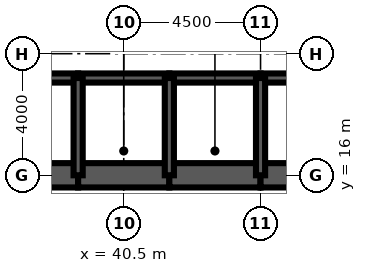
"""IFC4 building model, lengths in metres.
Left out: names, types, materials, properties, quantities, classifications, styles, units other than length and angle.
Written with IfcOpenShell. Run it as: python <this file> out.ifc"""

import sys

from ifc_helpers import new_model, si_unit, direction, frame, frame_2d, origin, place, context, subcontext, project, spatial, rectangle, extrude, element, fill, save


model = new_model("IFC4")
c1 = context("Model", 3, precision=1e-05, world=origin(), true_north=direction((0.0, 1.0)))
c2 = subcontext(c1, "Body", "Model", "MODEL_VIEW")
j1 = project(units=[si_unit("LENGTHUNIT", "METRE"), si_unit("PLANEANGLEUNIT", "RADIAN")], contexts=[c1])
p1 = place(None, origin())
s1 = spatial("IfcSite", under=j1, at=p1, CompositionType="ELEMENT")
p2 = place(p1, origin())
s2 = spatial("IfcBuilding", under=s1, at=p2, CompositionType="ELEMENT")
p3 = place(p2, frame((0.0, 0.0, 236.2)))
s3 = spatial("IfcBuildingStorey", under=s2, at=p3, CompositionType="ELEMENT", Elevation=236.2)
for number, where, z_axis, x_axis in (
    (1, (36.0, 16.0, 0.0), (0.0, 0.0, 1.0), (1.0, 0.0, 0.0)),
    (2, (39.0, 16.0, 0.0), (0.0, 0.0, 1.0), (1.0, 0.0, 0.0)),
    (3, (42.0, 16.0, 0.0), (0.0, 0.0, 1.0), (1.0, 0.0, 0.0)),
):
    element("IfcWall", number, at=place(p3, frame(where, z_axis=z_axis, x_axis=x_axis)), inside=s3, PredefinedType="SHEAR", context=c2, shape_type="SweptSolid", body=[
        extrude(rectangle(XDim=3.0, YDim=0.8, at=frame_2d((1.5, 0.0))), origin(), (0.0, 0.0, 1.0), 4.2),
    ])
p4 = place(p3, frame((45.0, 16.0, 0.0), z_axis=(0.0, 0.0, 1.0), x_axis=(1.0, 0.0, 0.0)))
e4 = element("IfcWall", 4, at=p4, inside=s3, PredefinedType="SHEAR", context=c2, shape_type="SweptSolid", body=[
    extrude(rectangle(XDim=9.4, YDim=0.8, at=frame_2d((4.7, 0.0))), origin(), (0.0, 0.0, 1.0), 4.2),
])
p5 = place(p3, frame((36.0, 19.2, 0.0), z_axis=(0.0, 0.0, 1.0), x_axis=(1.0, 0.0, 0.0)))
e5 = element("IfcWall", 5, at=p5, inside=s3, PredefinedType="SOLIDWALL", context=c2, shape_type="SweptSolid", body=[
    extrude(rectangle(XDim=3.0, YDim=0.3, at=frame_2d((1.5, 0.0))), origin(), (0.0, 0.0, 1.0), 4.2),
])
p6 = place(p5, frame((0.95, 0.0, 0.0)))
e6 = element("IfcOpeningElement", 6, at=p6, cuts=e5, PredefinedType="OPENING", context=c2, shape_type="SweptSolid", body=[
    extrude(rectangle(XDim=1.1, YDim=2.2, at=frame_2d((0.55, 1.1))), frame((0.0, 0.16, 0.0), z_axis=(0.0, -1.0, 0.0), x_axis=(1.0, 0.0, 0.0)), (0.0, 0.0, 1.0), 0.32),
])
p7 = place(p3, frame((39.0, 19.2, 0.0), z_axis=(0.0, 0.0, 1.0), x_axis=(1.0, 0.0, 0.0)))
e7 = element("IfcWall", 7, at=p7, inside=s3, PredefinedType="SOLIDWALL", context=c2, shape_type="SweptSolid", body=[
    extrude(rectangle(XDim=3.0, YDim=0.3, at=frame_2d((1.5, 0.0))), origin(), (0.0, 0.0, 1.0), 4.2),
])
p8 = place(p7, frame((1.0, 0.0, 0.0)))
e8 = element("IfcOpeningElement", 8, at=p8, cuts=e7, PredefinedType="OPENING", context=c2, shape_type="SweptSolid", body=[
    extrude(rectangle(XDim=1.0, YDim=2.1, at=frame_2d((0.5, 1.05))), frame((0.0, 0.16, 0.0), z_axis=(0.0, -1.0, 0.0), x_axis=(1.0, 0.0, 0.0)), (0.0, 0.0, 1.0), 0.32),
])
p9 = place(p3, frame((42.0, 19.2, 0.0), z_axis=(0.0, 0.0, 1.0), x_axis=(1.0, 0.0, 0.0)))
e9 = element("IfcWall", 9, at=p9, inside=s3, PredefinedType="SOLIDWALL", context=c2, shape_type="SweptSolid", body=[
    extrude(rectangle(XDim=3.0, YDim=0.3, at=frame_2d((1.5, 0.0))), origin(), (0.0, 0.0, 1.0), 4.2),
])
p10 = place(p9, frame((1.0, 0.0, 0.0)))
e10 = element("IfcOpeningElement", 10, at=p10, cuts=e9, PredefinedType="OPENING", context=c2, shape_type="SweptSolid", body=[
    extrude(rectangle(XDim=1.0, YDim=2.1, at=frame_2d((0.5, 1.05))), frame((0.0, 0.16, 0.0), z_axis=(0.0, -1.0, 0.0), x_axis=(1.0, 0.0, 0.0)), (0.0, 0.0, 1.0), 0.32),
])
p11 = place(p3, frame((45.0, 19.2, 0.0), z_axis=(0.0, 0.0, 1.0), x_axis=(1.0, 0.0, 0.0)))
e11 = element("IfcWall", 11, at=p11, inside=s3, PredefinedType="SOLIDWALL", context=c2, shape_type="SweptSolid", body=[
    extrude(rectangle(XDim=9.0, YDim=0.3, at=frame_2d((4.5, 0.0))), origin(), (0.0, 0.0, 1.0), 4.2),
])
p12 = place(p11, frame((7.35, 0.0, 0.0)))
e12 = element("IfcOpeningElement", 12, at=p12, cuts=e11, PredefinedType="OPENING", context=c2, shape_type="SweptSolid", body=[
    extrude(rectangle(XDim=1.0, YDim=2.1, at=frame_2d((0.5, 1.05))), frame((0.0, 0.16, 0.0), z_axis=(0.0, -1.0, 0.0), x_axis=(1.0, 0.0, 0.0)), (0.0, 0.0, 1.0), 0.32),
])
for number, where, z_axis, x_axis in (
    (13, (39.0, 16.0, 0.0), (0.0, 0.0, 1.0), (0.0, 1.0, 0.0)),
    (14, (42.0, 16.0, 0.0), (0.0, 0.0, 1.0), (0.0, 1.0, 0.0)),
    (15, (45.0, 16.0, 0.0), (0.0, 0.0, 1.0), (0.0, 1.0, 0.0)),
):
    element("IfcWall", number, at=place(p3, frame(where, z_axis=z_axis, x_axis=x_axis)), inside=s3, PredefinedType="SOLIDWALL", context=c2, shape_type="SweptSolid", body=[
        extrude(rectangle(XDim=3.2, YDim=0.3, at=frame_2d((1.6, 0.0))), origin(), (0.0, 0.0, 1.0), 4.2),
    ])
p13 = place(p3, frame((39.15, 17.35, 0.0), z_axis=(0.0, 0.0, 1.0), x_axis=(1.0, 0.0, 0.0)))
e16 = element("IfcWall", 16, at=p13, inside=s3, PredefinedType="SOLIDWALL", context=c2, shape_type="SweptSolid", body=[
    extrude(rectangle(XDim=2.7, YDim=0.3, at=frame_2d((1.35, 0.0))), origin(), (0.0, 0.0, 1.0), 4.04),
])
p14 = place(p13, frame((0.85, 0.0, 0.0)))
e17 = element("IfcOpeningElement", 17, at=p14, cuts=e16, PredefinedType="OPENING", context=c2, shape_type="SweptSolid", body=[
    extrude(rectangle(XDim=1.0, YDim=2.1, at=frame_2d((0.5, 1.05))), frame((0.0, 0.16, 0.0), z_axis=(0.0, -1.0, 0.0), x_axis=(1.0, 0.0, 0.0)), (0.0, 0.0, 1.0), 0.32),
])
p15 = place(p3, frame((42.15, 17.35, 0.0), z_axis=(0.0, 0.0, 1.0), x_axis=(1.0, 0.0, 0.0)))
e18 = element("IfcWall", 18, at=p15, inside=s3, PredefinedType="SOLIDWALL", context=c2, shape_type="SweptSolid", body=[
    extrude(rectangle(XDim=2.7, YDim=0.3, at=frame_2d((1.35, 0.0))), origin(), (0.0, 0.0, 1.0), 4.04),
])
p16 = place(p15, frame((0.85, 0.0, 0.0)))
e19 = element("IfcOpeningElement", 19, at=p16, cuts=e18, PredefinedType="OPENING", context=c2, shape_type="SweptSolid", body=[
    extrude(rectangle(XDim=1.0, YDim=2.1, at=frame_2d((0.5, 1.05))), frame((0.0, 0.16, 0.0), z_axis=(0.0, -1.0, 0.0), x_axis=(1.0, 0.0, 0.0)), (0.0, 0.0, 1.0), 0.32),
])
p17 = place(p14, origin())
e20 = element("IfcDoor", 20, at=p17, inside=s3, OperationType="SINGLE_SWING_LEFT", PredefinedType="DOOR", context=c2, shape_type="SweptSolid", body=[
    extrude(rectangle(XDim=1.0, YDim=2.1, at=frame_2d((0.5, 1.05))), frame((0.0, 0.025, 0.0), z_axis=(0.0, -1.0, 0.0), x_axis=(1.0, 0.0, 0.0)), (0.0, 0.0, 1.0), 0.05),
])
fill(e17, e20)
p18 = place(p16, origin())
e21 = element("IfcDoor", 21, at=p18, inside=s3, OperationType="SINGLE_SWING_LEFT", PredefinedType="DOOR", context=c2, shape_type="SweptSolid", body=[
    extrude(rectangle(XDim=1.0, YDim=2.1, at=frame_2d((0.5, 1.05))), frame((0.0, 0.025, 0.0), z_axis=(0.0, -1.0, 0.0), x_axis=(1.0, 0.0, 0.0)), (0.0, 0.0, 1.0), 0.05),
])
fill(e19, e21)
p19 = place(p8, origin())
e22 = element("IfcDoor", 22, at=p19, inside=s3, OperationType="SINGLE_SWING_LEFT", PredefinedType="DOOR", context=c2, shape_type="SweptSolid", body=[
    extrude(rectangle(XDim=1.0, YDim=2.1, at=frame_2d((0.5, 1.05))), frame((0.0, 0.025, 0.0), z_axis=(0.0, -1.0, 0.0), x_axis=(1.0, 0.0, 0.0)), (0.0, 0.0, 1.0), 0.05),
])
fill(e8, e22)
p20 = place(p10, origin())
e23 = element("IfcDoor", 23, at=p20, inside=s3, OperationType="SINGLE_SWING_LEFT", PredefinedType="DOOR", context=c2, shape_type="SweptSolid", body=[
    extrude(rectangle(XDim=1.0, YDim=2.1, at=frame_2d((0.5, 1.05))), frame((0.0, 0.025, 0.0), z_axis=(0.0, -1.0, 0.0), x_axis=(1.0, 0.0, 0.0)), (0.0, 0.0, 1.0), 0.05),
])
fill(e10, e23)
save(model, sys.argv[1])
